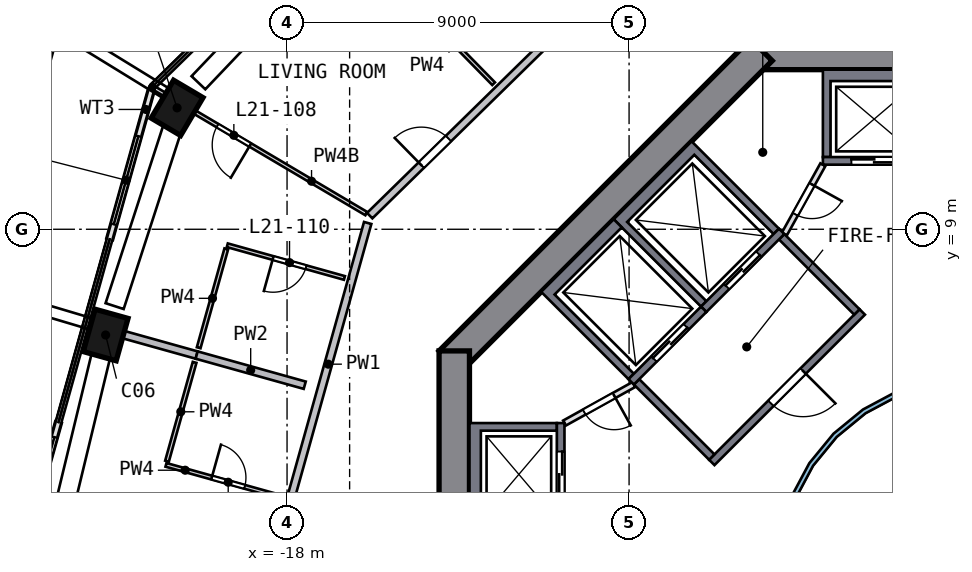
"""IFC4 building model, lengths in metres.
Left out: names, types, materials, properties, quantities, classifications, styles, units other than length and angle.
Written with IfcOpenShell. Run it as: python <this file> out.ifc"""

import sys

from ifc_helpers import new_model, si_unit, direction, frame, frame_2d, origin, origin_2d, place, context, subcontext, project, spatial, polyline, rectangle, outline, extrude, element, fill, save


model = new_model("IFC4")
c1 = context("Model", 3, precision=1e-05, world=origin(), true_north=direction((0.0, 1.0)))
c2 = subcontext(c1, "Body", "Model", "MODEL_VIEW")
j1 = project(units=[si_unit("LENGTHUNIT", "METRE"), si_unit("PLANEANGLEUNIT", "RADIAN")], contexts=[c1])
p1 = place(None, origin())
s1 = spatial("IfcSite", under=j1, at=p1, CompositionType="ELEMENT")
p2 = place(p1, origin())
s2 = spatial("IfcBuilding", under=s1, at=p2, CompositionType="ELEMENT")
p3 = place(p2, frame((0.0, 0.0, 93.0)))
s3 = spatial("IfcBuildingStorey", under=s2, at=p3, CompositionType="ELEMENT", Elevation=93.0)
p4 = place(p3, frame((-20.824, 12.315, 0.0), z_axis=(-0.057704047, -0.099518574, 0.993361111), x_axis=(0.505557069, 0.855090222, 0.115033745)))
e1 = element("IfcColumn", 1, at=p4, inside=s3, PredefinedType="COLUMN", context=c2, shape_type="SweptSolid", body=[
    extrude(rectangle(XDim=1.15, YDim=0.9, at=origin_2d()), origin(), (0.0, 0.0, 1.0), 3.211),
])
p5 = place(p3, frame((-22.739, 6.349, 0.0), z_axis=(-0.029279539, -0.108372319, 0.993679098), x_axis=(-0.267305592, -0.957051078, -0.112253975)))
e2 = element("IfcColumn", 2, at=p5, inside=s3, PredefinedType="COLUMN", context=c2, shape_type="SweptSolid", body=[
    extrude(rectangle(XDim=1.15, YDim=0.9, at=origin_2d()), origin(), (0.0, 0.0, 1.0), 3.21),
])
p6 = place(p3, frame((5.799, 13.6, 0.0), z_axis=(0.0, 0.0, 1.0), x_axis=(-1.0, 0.0, 0.0)))
e3 = element("IfcWall", 3, at=p6, inside=s3, PredefinedType="SHEAR", context=c2, shape_type="SweptSolid", body=[
    extrude(rectangle(XDim=11.598, YDim=0.8, at=frame_2d((5.799, 0.0))), origin(), (0.0, 0.0, 1.0), 3.5),
])
p7 = place(p6, frame((4.899, 0.0, 0.0)))
e4 = element("IfcOpeningElement", 4, at=p7, cuts=e3, PredefinedType="OPENING", context=c2, shape_type="SweptSolid", body=[
    extrude(rectangle(XDim=1.8, YDim=2.1, at=frame_2d((0.9, 1.05))), frame((0.0, 0.41, 0.0), z_axis=(0.0, -1.0, 0.0), x_axis=(1.0, 0.0, 0.0)), (0.0, 0.0, 1.0), 0.82),
])
p8 = place(p3, frame((-5.516, 13.717, 0.0), z_axis=(0.0, 0.0, 1.0), x_axis=(-0.707106781, -0.707106781, 0.0)))
e5 = element("IfcWall", 5, at=p8, inside=s3, PredefinedType="SHEAR", context=c2, shape_type="SweptSolid", body=[
    extrude(rectangle(XDim=11.598, YDim=0.8, at=frame_2d((5.799, 0.0))), origin(), (0.0, 0.0, 1.0), 3.5),
])
p9 = place(p3, frame((-13.6, 5.799, 0.0), z_axis=(0.0, 0.0, 1.0), x_axis=(0.0, -1.0, 0.0)))
e6 = element("IfcWall", 6, at=p9, inside=s3, PredefinedType="SHEAR", context=c2, shape_type="SweptSolid", body=[
    extrude(rectangle(XDim=11.598, YDim=0.8, at=frame_2d((5.799, 0.0))), origin(), (0.0, 0.0, 1.0), 3.5),
])
p10 = place(p9, frame((4.899, 0.0, 0.0)))
e7 = element("IfcOpeningElement", 7, at=p10, cuts=e6, PredefinedType="OPENING", context=c2, shape_type="SweptSolid", body=[
    extrude(rectangle(XDim=1.8, YDim=2.1, at=frame_2d((0.9, 1.05))), frame((0.0, 0.41, 0.0), z_axis=(0.0, -1.0, 0.0), x_axis=(1.0, 0.0, 0.0)), (0.0, 0.0, 1.0), 0.82),
])
p11 = place(p3, frame((-21.572, 12.667, 0.0), z_axis=(0.0, 0.0, 1.0), x_axis=(-0.268881842, -0.96317317, 0.0)))
e8 = element("IfcWall", 8, at=p11, inside=s3, PredefinedType="SOLIDWALL", context=c2, shape_type="SweptSolid", body=[
    extrude(rectangle(XDim=4.068, YDim=0.15, at=frame_2d((2.034, 0.0))), origin(), (0.0, 0.0, 1.0), 2.425),
])
p12 = place(p11, frame((1.268, 0.0, 0.0)))
e9 = element("IfcOpeningElement", 9, at=p12, cuts=e8, PredefinedType="OPENING", context=c2, shape_type="SweptSolid", body=[
    extrude(rectangle(XDim=2.4, YDim=2.4, at=frame_2d((1.2, 1.2))), frame((0.0, 0.085, 0.0), z_axis=(0.0, -1.0, 0.0), x_axis=(1.0, 0.0, 0.0)), (0.0, 0.0, 1.0), 0.17),
])
p13 = place(p3, frame((-24.016, 3.913, 0.0), z_axis=(0.0, 0.0, 1.0), x_axis=(-0.268875634, -0.963174903, 0.0)))
e10 = element("IfcWall", 10, at=p13, inside=s3, PredefinedType="SOLIDWALL", context=c2, shape_type="SweptSolid", body=[
    extrude(rectangle(XDim=3.71, YDim=0.15, at=frame_2d((1.855, 0.0))), origin(), (0.0, 0.0, 1.0), 2.425),
])
p14 = place(p13, frame((0.4, 0.0, 0.0)))
e11 = element("IfcOpeningElement", 11, at=p14, cuts=e10, PredefinedType="OPENING", context=c2, shape_type="SweptSolid", body=[
    extrude(rectangle(XDim=2.4, YDim=2.4, at=frame_2d((1.2, 1.2))), frame((0.0, 0.085, 0.0), z_axis=(0.0, -1.0, 0.0), x_axis=(1.0, 0.0, 0.0)), (0.0, 0.0, 1.0), 0.17),
])
p15 = place(p3, frame((-24.263, 14.274, 0.0), z_axis=(0.0, 0.0, 1.0), x_axis=(-0.26893369, -0.963158694, 0.0)))
e12 = element("IfcWall", 12, at=p15, inside=s3, PredefinedType="SOLIDWALL", context=c2, shape_type="SweptSolid", body=[
    extrude(rectangle(XDim=13.723, YDim=0.5, at=frame_2d((6.862, 0.0))), origin(), (0.0, 0.0, 1.0), 0.7),
])
p16 = place(p3, origin())
e13 = element("IfcWall", 13, at=p16, inside=s3, PredefinedType="SOLIDWALL", context=c2, shape_type="SweptSolid", body=[
    extrude(outline(polyline([(-3.9, 10.9), (-3.9, 13.2), (-1.2, 13.2), (-1.2, 10.9), (-1.4, 10.9), (-1.4, 12.9), (-3.7, 12.9), (-3.7, 10.9), (-3.9, 10.9)])), origin(), (0.0, 0.0, 1.0), 3.19),
])
p17 = place(p3, frame((-1.2, 10.8, 0.0), z_axis=(0.0, 0.0, 1.0), x_axis=(-1.0, 0.0, 0.0)))
e14 = element("IfcWall", 14, at=p17, inside=s3, PredefinedType="SOLIDWALL", context=c2, shape_type="SweptSolid", body=[
    extrude(rectangle(XDim=2.7, YDim=0.2, at=frame_2d((1.35, 0.0))), origin(), (0.0, 0.0, 1.0), 3.19),
])
p18 = place(p17, frame((0.75, 0.0, 0.0)))
e15 = element("IfcOpeningElement", 15, at=p18, cuts=e14, PredefinedType="OPENING", context=c2, shape_type="SweptSolid", body=[
    extrude(rectangle(XDim=1.2, YDim=2.1, at=frame_2d((0.6, 1.05))), frame((0.0, 0.11, 0.0), z_axis=(0.0, -1.0, 0.0), x_axis=(1.0, 0.0, 0.0)), (0.0, 0.0, 1.0), 0.22),
])
p19 = place(p3, origin())
e16 = element("IfcWall", 16, at=p19, inside=s3, PredefinedType="SOLIDWALL", context=c2, shape_type="SweptSolid", body=[
    extrude(outline(polyline([(-13.2, 3.9), (-10.9, 3.9), (-10.9, 3.7), (-12.9, 3.7), (-12.9, 1.4), (-10.9, 1.4), (-10.9, 1.2), (-13.2, 1.2), (-13.2, 3.9)])), origin(), (0.0, 0.0, 1.0), 3.19),
])
p20 = place(p3, frame((-10.8, 1.2, 0.0), z_axis=(0.0, 0.0, 1.0), x_axis=(0.0, 1.0, 0.0)))
e17 = element("IfcWall", 17, at=p20, inside=s3, PredefinedType="SOLIDWALL", context=c2, shape_type="SweptSolid", body=[
    extrude(rectangle(XDim=2.7, YDim=0.2, at=frame_2d((1.35, 0.0))), origin(), (0.0, 0.0, 1.0), 3.19),
])
p21 = place(p20, frame((0.75, 0.0, 0.0)))
e18 = element("IfcOpeningElement", 18, at=p21, cuts=e17, PredefinedType="OPENING", context=c2, shape_type="SweptSolid", body=[
    extrude(rectangle(XDim=1.2, YDim=2.1, at=frame_2d((0.6, 1.05))), frame((0.0, 0.11, 0.0), z_axis=(0.0, -1.0, 0.0), x_axis=(1.0, 0.0, 0.0)), (0.0, 0.0, 1.0), 0.22),
])
p22 = place(p3, origin())
e19 = element("IfcWall", 19, at=p22, inside=s3, PredefinedType="SOLIDWALL", context=c2, shape_type="SweptSolid", body=[
    extrude(outline(polyline([(-9.405, 9.263), (-7.354, 11.314), (-5.056, 9.016), (-5.197, 8.874), (-7.283, 10.96), (-9.051, 9.192), (-6.965, 7.106), (-7.106, 6.965), (-9.405, 9.263)])), origin(), (0.0, 0.0, 1.0), 3.19),
])
p23 = place(p3, frame((-4.985, 8.945, 0.0), z_axis=(0.0, 0.0, 1.0), x_axis=(-0.707106781, -0.707106781, 0.0)))
e20 = element("IfcWall", 20, at=p23, inside=s3, PredefinedType="SOLIDWALL", context=c2, shape_type="SweptSolid", body=[
    extrude(rectangle(XDim=2.9, YDim=0.2, at=frame_2d((1.45, 0.0))), origin(), (0.0, 0.0, 1.0), 3.19),
])
p24 = place(p23, frame((0.85, 0.0, 0.0)))
e21 = element("IfcOpeningElement", 21, at=p24, cuts=e20, PredefinedType="OPENING", context=c2, shape_type="SweptSolid", body=[
    extrude(rectangle(XDim=1.2, YDim=2.1, at=frame_2d((0.6, 1.05))), frame((0.0, 0.11, 0.0), z_axis=(0.0, -1.0, 0.0), x_axis=(1.0, 0.0, 0.0)), (0.0, 0.0, 1.0), 0.22),
])
p25 = place(p3, origin())
e22 = element("IfcWall", 22, at=p25, inside=s3, PredefinedType="SOLIDWALL", context=c2, shape_type="SweptSolid", body=[
    extrude(outline(polyline([(-11.314, 7.354), (-9.405, 9.263), (-9.192, 9.051), (-10.96, 7.283), (-8.874, 5.197), (-9.016, 5.056), (-11.314, 7.354)])), origin(), (0.0, 0.0, 1.0), 3.19),
])
p26 = place(p3, frame((-7.036, 6.894, 0.0), z_axis=(0.0, 0.0, 1.0), x_axis=(-0.707106781, -0.707106781, 0.0)))
e23 = element("IfcWall", 23, at=p26, inside=s3, PredefinedType="SOLIDWALL", context=c2, shape_type="SweptSolid", body=[
    extrude(rectangle(XDim=2.7, YDim=0.2, at=frame_2d((1.35, 0.0))), origin(), (0.0, 0.0, 1.0), 3.19),
])
p27 = place(p26, frame((0.65, 0.0, 0.0)))
e24 = element("IfcOpeningElement", 24, at=p27, cuts=e23, PredefinedType="OPENING", context=c2, shape_type="SweptSolid", body=[
    extrude(rectangle(XDim=1.2, YDim=2.1, at=frame_2d((0.6, 1.05))), frame((0.0, 0.11, 0.0), z_axis=(0.0, -1.0, 0.0), x_axis=(1.0, 0.0, 0.0)), (0.0, 0.0, 1.0), 0.22),
])
p28 = place(p3, frame((-2.864, 6.823, 0.0), z_axis=(0.0, 0.0, 1.0), x_axis=(-0.707106781, -0.707106781, 0.0)))
e25 = element("IfcWall", 25, at=p28, inside=s3, PredefinedType="SOLIDWALL", context=c2, shape_type="SweptSolid", body=[
    extrude(rectangle(XDim=5.6, YDim=0.2, at=frame_2d((2.8, 0.0))), origin(), (0.0, 0.0, 1.0), 3.19),
])
p29 = place(p28, frame((2.2, 0.0, 0.0)))
e26 = element("IfcOpeningElement", 26, at=p29, cuts=e25, PredefinedType="OPENING", context=c2, shape_type="SweptSolid", body=[
    extrude(rectangle(XDim=1.2, YDim=2.1, at=frame_2d((0.6, 1.05))), frame((0.0, 0.11, 0.0), z_axis=(0.0, -1.0, 0.0), x_axis=(1.0, 0.0, 0.0)), (0.0, 0.0, 1.0), 0.22),
])
for number, where, z_axis, x_axis in (
    (27, (-3.005, 6.823, 0.0), (0.0, 0.0, 1.0), (-0.707, 0.707, 0.0)),
    (28, (-6.823, 3.005, 0.0), (0.0, 0.0, 1.0), (-0.707, 0.707, 0.0)),
):
    element("IfcWall", number, at=place(p3, frame(where, z_axis=z_axis, x_axis=x_axis)), inside=s3, PredefinedType="SOLIDWALL", context=c2, shape_type="SweptSolid", body=[
        extrude(rectangle(XDim=2.8, YDim=0.2, at=frame_2d((1.4, 0.0))), origin(), (0.0, 0.0, 1.0), 3.19),
    ])
p30 = place(p3, frame((-3.9, 10.7, 0.0), z_axis=(0.0, 0.0, 1.0), x_axis=(-0.485692555, -0.874129705, 0.0)))
e29 = element("IfcWall", 29, at=p30, inside=s3, PredefinedType="PARTITIONING", context=c2, shape_type="SweptSolid", body=[
    extrude(rectangle(XDim=2.089, YDim=0.15, at=frame_2d((1.044, 0.0))), origin(), (0.0, 0.0, 1.0), 3.19),
])
p31 = place(p30, frame((0.594, 0.0, 0.0)))
e30 = element("IfcOpeningElement", 30, at=p31, cuts=e29, PredefinedType="OPENING", context=c2, shape_type="SweptSolid", body=[
    extrude(rectangle(XDim=0.9, YDim=2.1, at=frame_2d((0.45, 1.05))), frame((0.0, 0.085, 0.0), z_axis=(0.0, -1.0, 0.0), x_axis=(1.0, 0.0, 0.0)), (0.0, 0.0, 1.0), 0.17),
])
p32 = place(p3, frame((-8.874, 4.914, 0.0), z_axis=(0.0, 0.0, 1.0), x_axis=(-0.874129705, -0.485692555, 0.0)))
e31 = element("IfcWall", 31, at=p32, inside=s3, PredefinedType="PARTITIONING", context=c2, shape_type="SweptSolid", body=[
    extrude(rectangle(XDim=2.089, YDim=0.15, at=frame_2d((1.044, 0.0))), origin(), (0.0, 0.0, 1.0), 3.19),
])
p33 = place(p32, frame((0.594, 0.0, 0.0)))
e32 = element("IfcOpeningElement", 32, at=p33, cuts=e31, PredefinedType="OPENING", context=c2, shape_type="SweptSolid", body=[
    extrude(rectangle(XDim=0.9, YDim=2.1, at=frame_2d((0.45, 1.05))), frame((0.0, 0.085, 0.0), z_axis=(0.0, -1.0, 0.0), x_axis=(1.0, 0.0, 0.0)), (0.0, 0.0, 1.0), 0.17),
])
p34 = place(p3, origin())
e33 = element("IfcWall", 33, at=p34, inside=s3, PredefinedType="SOLIDWALL", context=c2, shape_type="SweptSolid", body=[
    extrude(outline(polyline([(5.021, -0.999), (4.73, -1.959), (4.257, -2.844), (3.62, -3.62), (2.844, -4.257), (1.959, -4.73), (0.999, -5.021), (0.0, -5.12), (-0.999, -5.021), (-1.959, -4.73), (-2.844, -4.257), (-3.62, -3.62), (-4.257, -2.844), (-4.73, -1.959), (-5.021, -0.999), (-5.12, 0.0), (-5.021, 0.999), (-4.73, 1.959), (-4.257, 2.844), (-3.62, 3.62), (-2.844, 4.257), (-1.959, 4.73), (-0.999, 5.021), (0.0, 5.12), (0.999, 5.021), (1.959, 4.73), (2.844, 4.257), (3.62, 3.62), (4.257, 2.844), (4.73, 1.959), (5.021, 0.999), (5.12, 0.0), (5.021, -0.999)]), holes=[polyline([(4.904, 0.976), (4.619, 1.913), (4.157, 2.778), (3.535, 3.535), (2.778, 4.157), (1.913, 4.619), (0.976, 4.904), (0.0, 5.0), (-0.976, 4.904), (-1.913, 4.619), (-2.778, 4.157), (-3.535, 3.535), (-4.157, 2.778), (-4.619, 1.913), (-4.904, 0.976), (-5.0, 0.0), (-4.904, -0.976), (-4.619, -1.913), (-4.157, -2.778), (-3.535, -3.535), (-2.778, -4.157), (-1.913, -4.619), (-0.976, -4.904), (0.0, -5.0), (0.976, -4.904), (1.913, -4.619), (2.778, -4.157), (3.535, -3.535), (4.157, -2.778), (4.619, -1.913), (4.904, -0.976), (5.0, 0.0), (4.904, 0.976)])]), origin(), (0.0, 0.0, 1.0), 3.19),
])
p35 = place(p3, frame((-18.33, 0.386, 0.0), z_axis=(0.0, 0.0, 1.0), x_axis=(0.268911641, 0.96316485, 0.0)))
e34 = element("IfcWall", 34, at=p35, inside=s3, PredefinedType="SOLIDWALL", context=c2, shape_type="SweptSolid", body=[
    extrude(rectangle(XDim=9.116, YDim=0.2, at=frame_2d((4.558, 0.0))), origin(), (0.0, 0.0, 1.0), 3.19),
])
p36 = place(p35, frame((0.2, 0.0, 0.0)))
e35 = element("IfcOpeningElement", 35, at=p36, cuts=e34, PredefinedType="OPENING", context=c2, shape_type="SweptSolid", body=[
    extrude(rectangle(XDim=1.0, YDim=2.1, at=frame_2d((0.5, 1.05))), frame((0.0, 0.11, 0.0), z_axis=(0.0, -1.0, 0.0), x_axis=(1.0, 0.0, 0.0)), (0.0, 0.0, 1.0), 0.22),
])
p37 = place(p3, frame((-15.824, 9.359, 0.0), z_axis=(0.0, 0.0, 1.0), x_axis=(0.714458026, 0.699678304, 0.0)))
e36 = element("IfcWall", 36, at=p37, inside=s3, PredefinedType="SOLIDWALL", context=c2, shape_type="SweptSolid", body=[
    extrude(rectangle(XDim=9.316, YDim=0.2, at=frame_2d((4.658, 0.0))), origin(), (0.0, 0.0, 1.0), 3.19),
])
p38 = place(p37, frame((1.9, 0.0, 0.0)))
e37 = element("IfcOpeningElement", 37, at=p38, cuts=e36, PredefinedType="OPENING", context=c2, shape_type="SweptSolid", body=[
    extrude(rectangle(XDim=1.0, YDim=2.1, at=frame_2d((0.5, 1.05))), frame((0.0, 0.11, 0.0), z_axis=(0.0, -1.0, 0.0), x_axis=(1.0, 0.0, 0.0)), (0.0, 0.0, 1.0), 0.22),
])
p39 = place(p3, frame((-20.379, 5.69, 0.0), z_axis=(0.0, 0.0, 1.0), x_axis=(-0.963170883, 0.268890033, 0.0)))
e38 = element("IfcWall", 38, at=p39, inside=s3, PredefinedType="SOLIDWALL", context=c2, shape_type="SweptSolid", body=[
    extrude(rectangle(XDim=2.95, YDim=0.2, at=frame_2d((1.475, 0.0))), origin(), (0.0, 0.0, 1.0), 3.19),
])
p40 = place(p3, frame((-17.535, 4.896, 0.0), z_axis=(0.0, 0.0, 1.0), x_axis=(-0.963150985, 0.268961298, 0.0)))
e39 = element("IfcWall", 39, at=p40, inside=s3, PredefinedType="SOLIDWALL", context=c2, shape_type="SweptSolid", body=[
    extrude(rectangle(XDim=2.953, YDim=0.2, at=frame_2d((1.477, 0.0))), origin(), (0.0, 0.0, 1.0), 3.19),
])
for number, where, z_axis, x_axis in (
    (40, (-21.159, 2.897, 0.0), (0.0, 0.0, 1.0), (0.269, 0.963, 0.0)),
    (41, (-19.599, 8.483, 0.0), (0.0, 0.0, 1.0), (-0.269, -0.963, 0.0)),
):
    element("IfcWall", number, at=place(p3, frame(where, z_axis=z_axis, x_axis=x_axis)), inside=s3, PredefinedType="PARTITIONING", context=c2, shape_type="SweptSolid", body=[
        extrude(rectangle(XDim=2.7, YDim=0.1, at=frame_2d((1.35, 0.0))), origin(), (0.0, 0.0, 1.0), 3.19),
    ])
p41 = place(p3, frame((-21.186, 2.8, 0.0), z_axis=(0.0, 0.0, 1.0), x_axis=(0.9631816, -0.26885164, 0.0)))
e42 = element("IfcWall", 42, at=p41, inside=s3, PredefinedType="PARTITIONING", context=c2, shape_type="SweptSolid", body=[
    extrude(rectangle(XDim=3.2, YDim=0.1, at=frame_2d((1.6, 0.0))), origin(), (0.0, 0.0, 1.0), 3.19),
])
p42 = place(p41, frame((1.25, 0.0, 0.0)))
e43 = element("IfcOpeningElement", 43, at=p42, cuts=e42, PredefinedType="OPENING", context=c2, shape_type="SweptSolid", body=[
    extrude(rectangle(XDim=0.9, YDim=2.1, at=frame_2d((0.45, 1.05))), frame((0.0, 0.06, 0.0), z_axis=(0.0, -1.0, 0.0), x_axis=(1.0, 0.0, 0.0)), (0.0, 0.0, 1.0), 0.12),
])
p43 = place(p3, frame((-15.914, 9.411, 0.0), z_axis=(0.0, 0.0, 1.0), x_axis=(-0.860735822, 0.509051908, 0.0)))
e44 = element("IfcWall", 44, at=p43, inside=s3, PredefinedType="PARTITIONING", context=c2, shape_type="SweptSolid", body=[
    extrude(rectangle(XDim=6.476, YDim=0.1, at=frame_2d((3.238, 0.0))), origin(), (0.0, 0.0, 1.0), 2.69),
])
p44 = place(p43, frame((3.55, 0.0, 0.0)))
e45 = element("IfcOpeningElement", 45, at=p44, cuts=e44, PredefinedType="OPENING", context=c2, shape_type="SweptSolid", body=[
    extrude(rectangle(XDim=1.0, YDim=2.1, at=frame_2d((0.5, 1.05))), frame((0.0, 0.06, 0.0), z_axis=(0.0, -1.0, 0.0), x_axis=(1.0, 0.0, 0.0)), (0.0, 0.0, 1.0), 0.12),
])
p45 = place(p3, frame((-16.49, 7.719, 0.0), z_axis=(0.0, 0.0, 1.0), x_axis=(-0.963161842, 0.268922415, 0.0)))
e46 = element("IfcWall", 46, at=p45, inside=s3, PredefinedType="PARTITIONING", context=c2, shape_type="SweptSolid", body=[
    extrude(rectangle(XDim=3.2, YDim=0.1, at=frame_2d((1.6, 0.0))), origin(), (0.0, 0.0, 1.0), 3.19),
])
p46 = place(p45, frame((1.05, 0.0, 0.0)))
e47 = element("IfcOpeningElement", 47, at=p46, cuts=e46, PredefinedType="OPENING", context=c2, shape_type="SweptSolid", body=[
    extrude(rectangle(XDim=0.9, YDim=2.1, at=frame_2d((0.45, 1.05))), frame((0.0, 0.06, 0.0), z_axis=(0.0, -1.0, 0.0), x_axis=(1.0, 0.0, 0.0)), (0.0, 0.0, 1.0), 0.12),
])
p47 = place(p3, frame((-16.868, 17.225, 0.0), z_axis=(0.0, 0.0, 1.0), x_axis=(0.699684325, -0.71445213, 0.0)))
e48 = element("IfcWall", 48, at=p47, inside=s3, PredefinedType="PARTITIONING", context=c2, shape_type="SweptSolid", body=[
    extrude(rectangle(XDim=6.15, YDim=0.1, at=frame_2d((3.075, 0.0))), origin(), (0.0, 0.0, 1.0), 3.19),
])
p48 = place(p47, frame((1.8, 0.0, 0.0)))
e49 = element("IfcOpeningElement", 49, at=p48, cuts=e48, PredefinedType="OPENING", context=c2, shape_type="SweptSolid", body=[
    extrude(rectangle(XDim=1.0, YDim=2.1, at=frame_2d((0.5, 1.05))), frame((0.0, 0.06, 0.0), z_axis=(0.0, -1.0, 0.0), x_axis=(1.0, 0.0, 0.0)), (0.0, 0.0, 1.0), 0.12),
])
p49 = place(p12, origin())
e50 = element("IfcDoor", 50, at=p49, inside=s3, OperationType="SLIDING_TO_LEFT", PredefinedType="DOOR", context=c2, shape_type="SweptSolid", body=[
    extrude(rectangle(XDim=2.4, YDim=2.4, at=frame_2d((1.2, 1.2))), frame((0.0, 0.025, 0.0), z_axis=(0.0, -1.0, 0.0), x_axis=(1.0, 0.0, 0.0)), (0.0, 0.0, 1.0), 0.05),
])
fill(e9, e50)
p50 = place(p14, origin())
e51 = element("IfcDoor", 51, at=p50, inside=s3, OperationType="SLIDING_TO_RIGHT", PredefinedType="DOOR", context=c2, shape_type="SweptSolid", body=[
    extrude(rectangle(XDim=2.4, YDim=2.4, at=frame_2d((1.2, 1.2))), frame((0.0, 0.025, 0.0), z_axis=(0.0, -1.0, 0.0), x_axis=(1.0, 0.0, 0.0)), (0.0, 0.0, 1.0), 0.05),
])
fill(e11, e51)
p51 = place(p18, origin())
e52 = element("IfcDoor", 52, at=p51, inside=s3, OperationType="DOUBLE_DOOR_SLIDING", PredefinedType="DOOR", context=c2, shape_type="SweptSolid", body=[
    extrude(rectangle(XDim=1.2, YDim=2.1, at=frame_2d((0.6, 1.05))), frame((0.0, 0.025, 0.0), z_axis=(0.0, -1.0, 0.0), x_axis=(1.0, 0.0, 0.0)), (0.0, 0.0, 1.0), 0.05),
])
fill(e15, e52)
p52 = place(p21, origin())
e53 = element("IfcDoor", 53, at=p52, inside=s3, OperationType="DOUBLE_DOOR_SLIDING", PredefinedType="DOOR", context=c2, shape_type="SweptSolid", body=[
    extrude(rectangle(XDim=1.2, YDim=2.1, at=frame_2d((0.6, 1.05))), frame((0.0, 0.025, 0.0), z_axis=(0.0, -1.0, 0.0), x_axis=(1.0, 0.0, 0.0)), (0.0, 0.0, 1.0), 0.05),
])
fill(e18, e53)
p53 = place(p24, origin())
e54 = element("IfcDoor", 54, at=p53, inside=s3, OperationType="DOUBLE_DOOR_SLIDING", PredefinedType="DOOR", context=c2, shape_type="SweptSolid", body=[
    extrude(rectangle(XDim=1.2, YDim=2.1, at=frame_2d((0.6, 1.05))), frame((0.0, 0.025, 0.0), z_axis=(0.0, -1.0, 0.0), x_axis=(1.0, 0.0, 0.0)), (0.0, 0.0, 1.0), 0.05),
])
fill(e21, e54)
p54 = place(p27, origin())
e55 = element("IfcDoor", 55, at=p54, inside=s3, OperationType="DOUBLE_DOOR_SLIDING", PredefinedType="DOOR", context=c2, shape_type="SweptSolid", body=[
    extrude(rectangle(XDim=1.2, YDim=2.1, at=frame_2d((0.6, 1.05))), frame((0.0, 0.025, 0.0), z_axis=(0.0, -1.0, 0.0), x_axis=(1.0, 0.0, 0.0)), (0.0, 0.0, 1.0), 0.05),
])
fill(e24, e55)
p55 = place(p29, origin())
e56 = element("IfcDoor", 56, at=p55, inside=s3, OperationType="SINGLE_SWING_LEFT", PredefinedType="DOOR", context=c2, shape_type="SweptSolid", body=[
    extrude(rectangle(XDim=1.2, YDim=2.1, at=frame_2d((0.6, 1.05))), frame((0.0, 0.025, 0.0), z_axis=(0.0, -1.0, 0.0), x_axis=(1.0, 0.0, 0.0)), (0.0, 0.0, 1.0), 0.05),
])
fill(e26, e56)
p56 = place(p31, origin())
e57 = element("IfcDoor", 57, at=p56, inside=s3, OperationType="SINGLE_SWING_LEFT", PredefinedType="DOOR", context=c2, shape_type="SweptSolid", body=[
    extrude(rectangle(XDim=0.9, YDim=2.1, at=frame_2d((0.45, 1.05))), frame((0.0, 0.025, 0.0), z_axis=(0.0, -1.0, 0.0), x_axis=(1.0, 0.0, 0.0)), (0.0, 0.0, 1.0), 0.05),
])
fill(e30, e57)
p57 = place(p33, origin())
e58 = element("IfcDoor", 58, at=p57, inside=s3, OperationType="SINGLE_SWING_LEFT", PredefinedType="DOOR", context=c2, shape_type="SweptSolid", body=[
    extrude(rectangle(XDim=0.9, YDim=2.1, at=frame_2d((0.45, 1.05))), frame((0.0, 0.025, 0.0), z_axis=(0.0, -1.0, 0.0), x_axis=(1.0, 0.0, 0.0)), (0.0, 0.0, 1.0), 0.05),
])
fill(e32, e58)
p58 = place(p38, origin())
e59 = element("IfcDoor", 59, at=p58, inside=s3, OperationType="SINGLE_SWING_LEFT", PredefinedType="DOOR", context=c2, shape_type="SweptSolid", body=[
    extrude(rectangle(XDim=1.0, YDim=2.1, at=frame_2d((0.5, 1.05))), frame((0.0, 0.025, 0.0), z_axis=(0.0, -1.0, 0.0), x_axis=(1.0, 0.0, 0.0)), (0.0, 0.0, 1.0), 0.05),
])
fill(e37, e59)
p59 = place(p44, origin())
e60 = element("IfcDoor", 60, at=p59, inside=s3, OperationType="SINGLE_SWING_LEFT", PredefinedType="DOOR", context=c2, shape_type="SweptSolid", body=[
    extrude(rectangle(XDim=1.0, YDim=2.1, at=frame_2d((0.5, 1.05))), frame((0.0, 0.025, 0.0), z_axis=(0.0, -1.0, 0.0), x_axis=(1.0, 0.0, 0.0)), (0.0, 0.0, 1.0), 0.05),
])
fill(e45, e60)
p60 = place(p46, origin())
e61 = element("IfcDoor", 61, at=p60, inside=s3, OperationType="SINGLE_SWING_RIGHT", PredefinedType="DOOR", context=c2, shape_type="SweptSolid", body=[
    extrude(rectangle(XDim=0.9, YDim=2.1, at=frame_2d((0.45, 1.05))), frame((0.0, 0.025, 0.0), z_axis=(0.0, -1.0, 0.0), x_axis=(1.0, 0.0, 0.0)), (0.0, 0.0, 1.0), 0.05),
])
fill(e47, e61)
p61 = place(p42, origin())
e62 = element("IfcDoor", 62, at=p61, inside=s3, OperationType="SINGLE_SWING_LEFT", PredefinedType="DOOR", context=c2, shape_type="SweptSolid", body=[
    extrude(rectangle(XDim=0.9, YDim=2.1, at=frame_2d((0.45, 1.05))), frame((0.0, 0.025, 0.0), z_axis=(0.0, -1.0, 0.0), x_axis=(1.0, 0.0, 0.0)), (0.0, 0.0, 1.0), 0.05),
])
fill(e43, e62)
save(model, sys.argv[1])
